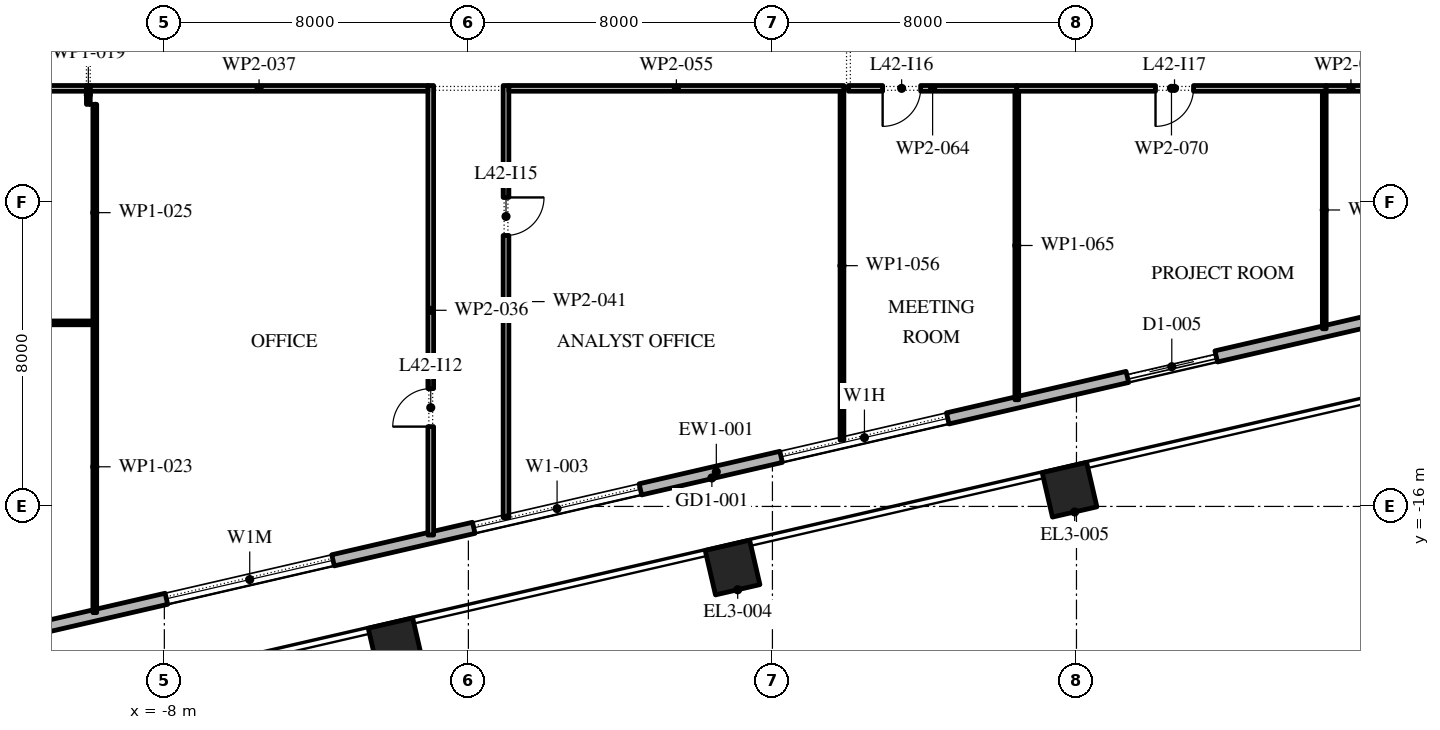
"""IFC4 building model, lengths in metres.
Left out: names, types, materials, properties, quantities, classifications, styles, units other than length and angle.
Written with IfcOpenShell. Run it as: python <this file> out.ifc"""

import sys

from ifc_helpers import new_model, si_unit, direction, frame, frame_2d, origin, origin_2d, place, context, subcontext, project, spatial, rectangle, extrude, element, fill, save


model = new_model("IFC4")
c1 = context("Model", 3, precision=1e-05, world=origin(), true_north=direction((0.0, 1.0)))
c2 = subcontext(c1, "Body", "Model", "MODEL_VIEW")
j1 = project(units=[si_unit("LENGTHUNIT", "METRE"), si_unit("PLANEANGLEUNIT", "RADIAN")], contexts=[c1])
p1 = place(None, origin())
s1 = spatial("IfcSite", under=j1, at=p1, CompositionType="ELEMENT")
p2 = place(p1, origin())
s2 = spatial("IfcBuilding", under=s1, at=p2, CompositionType="ELEMENT")
p3 = place(p2, frame((0.0, 0.0, 192.6)))
s3 = spatial("IfcBuildingStorey", under=s2, at=p3, CompositionType="ELEMENT", Elevation=192.6)
for number, where, z_axis, x_axis in (
    (1, (-1.916, -19.655, 0.0), (0.0, 0.0, 1.0), (0.974, 0.225, 0.0)),
    (2, (6.951, -17.608, 0.0), (0.0, 0.0, 1.0), (0.974, 0.225, 0.0)),
    (3, (15.818, -15.561, 0.0), (0.0, 0.0, 1.0), (0.974, 0.225, 0.0)),
):
    element("IfcColumn", number, at=place(p3, frame(where, z_axis=z_axis, x_axis=x_axis)), inside=s3, PredefinedType="COLUMN", context=c2, shape_type="SweptSolid", body=[
        extrude(rectangle(XDim=1.2, YDim=1.2, at=origin_2d()), origin(), (0.0, 0.0, 1.0), 4.2),
    ])
p4 = place(p3, frame((-17.592, -20.657, 0.0), z_axis=(0.0, 0.0, 1.0), x_axis=(0.974370243697, 0.224950279389, 0.0)))
e4 = element("IfcWall", 4, at=p4, inside=s3, PredefinedType="STANDARD", context=c2, shape_type="SweptSolid", body=[
    extrude(rectangle(XDim=49.5, YDim=0.3, at=frame_2d((24.75, 0.0))), origin(), (0.0, 0.0, 1.0), 4.0),
])
p5 = place(p4, frame((2.8, 0.0, 0.0)))
e5 = element("IfcOpeningElement", 5, at=p5, cuts=e4, PredefinedType="OPENING", context=c2, shape_type="SweptSolid", body=[
    extrude(rectangle(XDim=2.4, YDim=3.5, at=frame_2d((1.2, 1.75))), frame((0.0, 0.16, 0.0), z_axis=(0.0, -1.0, 0.0), x_axis=(1.0, 0.0, 0.0)), (0.0, 0.0, 1.0), 0.32),
])
p6 = place(p4, frame((9.9, 0.0, 0.45)))
e6 = element("IfcOpeningElement", 6, at=p6, cuts=e4, PredefinedType="OPENING", context=c2, shape_type="SweptSolid", body=[
    extrude(rectangle(XDim=4.5, YDim=2.575, at=frame_2d((2.25, 1.288))), frame((0.0, 0.16, 0.0), z_axis=(0.0, -1.0, 0.0), x_axis=(1.0, 0.0, 0.0)), (0.0, 0.0, 1.0), 0.32),
])
p7 = place(p4, frame((18.2, 0.0, 0.45)))
e7 = element("IfcOpeningElement", 7, at=p7, cuts=e4, PredefinedType="OPENING", context=c2, shape_type="SweptSolid", body=[
    extrude(rectangle(XDim=4.5, YDim=3.05, at=frame_2d((2.25, 1.525))), frame((0.0, 0.16, 0.0), z_axis=(0.0, -1.0, 0.0), x_axis=(1.0, 0.0, 0.0)), (0.0, 0.0, 1.0), 0.32),
])
p8 = place(p4, frame((26.5, 0.0, 0.45)))
e8 = element("IfcOpeningElement", 8, at=p8, cuts=e4, PredefinedType="OPENING", context=c2, shape_type="SweptSolid", body=[
    extrude(rectangle(XDim=4.5, YDim=2.75, at=frame_2d((2.25, 1.375))), frame((0.0, 0.16, 0.0), z_axis=(0.0, -1.0, 0.0), x_axis=(1.0, 0.0, 0.0)), (0.0, 0.0, 1.0), 0.32),
])
p9 = place(p4, frame((35.85, 0.0, 0.0)))
e9 = element("IfcOpeningElement", 9, at=p9, cuts=e4, PredefinedType="OPENING", context=c2, shape_type="SweptSolid", body=[
    extrude(rectangle(XDim=2.4, YDim=3.5, at=frame_2d((1.2, 1.75))), frame((0.0, 0.16, 0.0), z_axis=(0.0, -1.0, 0.0), x_axis=(1.0, 0.0, 0.0)), (0.0, 0.0, 1.0), 0.32),
])
p10 = place(p4, frame((43.1, 0.0, 0.45)))
e10 = element("IfcOpeningElement", 10, at=p10, cuts=e4, PredefinedType="OPENING", context=c2, shape_type="SweptSolid", body=[
    extrude(rectangle(XDim=4.5, YDim=2.875, at=frame_2d((2.25, 1.438))), frame((0.0, 0.16, 0.0), z_axis=(0.0, -1.0, 0.0), x_axis=(1.0, 0.0, 0.0)), (0.0, 0.0, 1.0), 0.32),
])
p11 = place(p3, frame((33.157, -5.092, 0.0), z_axis=(0.0, 0.0, 1.0), x_axis=(-0.224950279389, 0.974370243697, 0.0)))
e11 = element("IfcWall", 11, at=p11, inside=s3, PredefinedType="STANDARD", context=c2, shape_type="SweptSolid", body=[
    extrude(rectangle(XDim=49.5, YDim=0.3, at=frame_2d((24.75, 0.0))), origin(), (0.0, 0.0, 1.0), 4.0),
])
p12 = place(p11, frame((2.207, 0.0, 0.0)))
e12 = element("IfcOpeningElement", 12, at=p12, cuts=e11, PredefinedType="OPENING", context=c2, shape_type="SweptSolid", body=[
    extrude(rectangle(XDim=2.4, YDim=3.125, at=frame_2d((1.2, 1.562))), frame((0.0, 0.16, 0.0), z_axis=(0.0, -1.0, 0.0), x_axis=(1.0, 0.0, 0.0)), (0.0, 0.0, 1.0), 0.32),
])
p13 = place(p11, frame((8.121, 0.0, 0.45)))
e13 = element("IfcOpeningElement", 13, at=p13, cuts=e11, PredefinedType="OPENING", context=c2, shape_type="SweptSolid", body=[
    extrude(rectangle(XDim=4.5, YDim=2.875, at=frame_2d((2.25, 1.438))), frame((0.0, 0.16, 0.0), z_axis=(0.0, -1.0, 0.0), x_axis=(1.0, 0.0, 0.0)), (0.0, 0.0, 1.0), 0.32),
])
p14 = place(p11, frame((15.236, 0.0, 0.45)))
e14 = element("IfcOpeningElement", 14, at=p14, cuts=e11, PredefinedType="OPENING", context=c2, shape_type="SweptSolid", body=[
    extrude(rectangle(XDim=4.5, YDim=2.875, at=frame_2d((2.25, 1.438))), frame((0.0, 0.16, 0.0), z_axis=(0.0, -1.0, 0.0), x_axis=(1.0, 0.0, 0.0)), (0.0, 0.0, 1.0), 0.32),
])
p15 = place(p11, frame((22.35, 0.0, 0.45)))
e15 = element("IfcOpeningElement", 15, at=p15, cuts=e11, PredefinedType="OPENING", context=c2, shape_type="SweptSolid", body=[
    extrude(rectangle(XDim=4.5, YDim=3.0, at=frame_2d((2.25, 1.5))), frame((0.0, 0.16, 0.0), z_axis=(0.0, -1.0, 0.0), x_axis=(1.0, 0.0, 0.0)), (0.0, 0.0, 1.0), 0.32),
])
p16 = place(p11, frame((30.514, 0.0, 0.0)))
e16 = element("IfcOpeningElement", 16, at=p16, cuts=e11, PredefinedType="OPENING", context=c2, shape_type="SweptSolid", body=[
    extrude(rectangle(XDim=2.4, YDim=3.45, at=frame_2d((1.2, 1.725))), frame((0.0, 0.16, 0.0), z_axis=(0.0, -1.0, 0.0), x_axis=(1.0, 0.0, 0.0)), (0.0, 0.0, 1.0), 0.32),
])
p17 = place(p11, frame((36.579, 0.0, 0.45)))
e17 = element("IfcOpeningElement", 17, at=p17, cuts=e11, PredefinedType="OPENING", context=c2, shape_type="SweptSolid", body=[
    extrude(rectangle(XDim=4.5, YDim=3.05, at=frame_2d((2.25, 1.525))), frame((0.0, 0.16, 0.0), z_axis=(0.0, -1.0, 0.0), x_axis=(1.0, 0.0, 0.0)), (0.0, 0.0, 1.0), 0.32),
])
p18 = place(p11, frame((43.693, 0.0, 0.45)))
e18 = element("IfcOpeningElement", 18, at=p18, cuts=e11, PredefinedType="OPENING", context=c2, shape_type="SweptSolid", body=[
    extrude(rectangle(XDim=4.5, YDim=3.05, at=frame_2d((2.25, 1.525))), frame((0.0, 0.16, 0.0), z_axis=(0.0, -1.0, 0.0), x_axis=(1.0, 0.0, 0.0)), (0.0, 0.0, 1.0), 0.32),
])
p19 = place(p3, frame((-10.0, -5.42, 0.0), z_axis=(0.0, 0.0, 1.0), x_axis=(0.0, 1.0, 0.0)))
e19 = element("IfcWall", 19, at=p19, inside=s3, PredefinedType="PARTITIONING", context=c2, shape_type="SweptSolid", body=[
    extrude(rectangle(XDim=0.495, YDim=0.1, at=frame_2d((0.248, 0.0))), origin(), (0.0, 0.0, 1.0), 4.0),
])
p20 = place(p3, frame((-10.05, -5.0, 0.0), z_axis=(0.0, 0.0, 1.0), x_axis=(-1.0, 0.0, 0.0)))
e20 = element("IfcWall", 20, at=p20, inside=s3, PredefinedType="PARTITIONING", context=c2, shape_type="SweptSolid", body=[
    extrude(rectangle(XDim=13.665, YDim=0.15, at=frame_2d((6.833, 0.0))), origin(), (0.0, 0.0, 1.0), 4.0),
])
p21 = place(p20, frame((5.09, 0.0, 0.0)))
e21 = element("IfcOpeningElement", 21, at=p21, cuts=e20, PredefinedType="OPENING", context=c2, shape_type="SweptSolid", body=[
    extrude(rectangle(XDim=1.0, YDim=2.1, at=frame_2d((0.5, 1.05))), frame((0.0, 0.085, 0.0), z_axis=(0.0, -1.0, 0.0), x_axis=(1.0, 0.0, 0.0)), (0.0, 0.0, 1.0), 0.17),
])
p22 = place(p3, frame((-9.83, -18.794, 0.0), z_axis=(0.0, 0.0, 1.0), x_axis=(0.0, 1.0, 0.0)))
e22 = element("IfcWall", 22, at=p22, inside=s3, PredefinedType="PARTITIONING", context=c2, shape_type="SweptSolid", body=[
    extrude(rectangle(XDim=7.674, YDim=0.1, at=frame_2d((3.837, 0.0))), origin(), (0.0, 0.0, 1.0), 4.0),
])
p23 = place(p3, frame((-9.88, -11.17, 0.0), z_axis=(0.0, 0.0, 1.0), x_axis=(-1.0, 0.0, 0.0)))
e23 = element("IfcWall", 23, at=p23, inside=s3, PredefinedType="PARTITIONING", context=c2, shape_type="SweptSolid", body=[
    extrude(rectangle(XDim=13.68, YDim=0.1, at=frame_2d((6.84, 0.0))), origin(), (0.0, 0.0, 1.0), 4.0),
])
p24 = place(p23, frame((3.81, 0.0, 0.0)))
e24 = element("IfcOpeningElement", 24, at=p24, cuts=e23, PredefinedType="OPENING", context=c2, shape_type="SweptSolid", body=[
    extrude(rectangle(XDim=0.9, YDim=2.1, at=frame_2d((0.45, 1.05))), frame((0.0, 0.06, 0.0), z_axis=(0.0, -1.0, 0.0), x_axis=(1.0, 0.0, 0.0)), (0.0, 0.0, 1.0), 0.12),
])
p25 = place(p3, frame((-9.83, -11.12, 0.0), z_axis=(0.0, 0.0, 1.0), x_axis=(0.0, 1.0, 0.0)))
e25 = element("IfcWall", 25, at=p25, inside=s3, PredefinedType="PARTITIONING", context=c2, shape_type="SweptSolid", body=[
    extrude(rectangle(XDim=5.7, YDim=0.1, at=frame_2d((2.85, 0.0))), origin(), (0.0, 0.0, 1.0), 4.0),
])
p26 = place(p3, frame((-0.99, -16.753, 0.0), z_axis=(0.0, 0.0, 1.0), x_axis=(0.0, 1.0, 0.0)))
e26 = element("IfcWall", 26, at=p26, inside=s3, PredefinedType="PARTITIONING", context=c2, shape_type="SweptSolid", body=[
    extrude(rectangle(XDim=11.828, YDim=0.15, at=frame_2d((5.914, 0.0))), origin(), (0.0, 0.0, 1.0), 4.0),
])
p27 = place(p26, frame((2.853, 0.0, 0.0)))
e27 = element("IfcOpeningElement", 27, at=p27, cuts=e26, PredefinedType="OPENING", context=c2, shape_type="SweptSolid", body=[
    extrude(rectangle(XDim=1.0, YDim=2.1, at=frame_2d((0.5, 1.05))), frame((0.0, 0.085, 0.0), z_axis=(0.0, -1.0, 0.0), x_axis=(1.0, 0.0, 0.0)), (0.0, 0.0, 1.0), 0.17),
])
p28 = place(p3, frame((-1.065, -5.0, 0.0), z_axis=(0.0, 0.0, 1.0), x_axis=(-1.0, 0.0, 0.0)))
e28 = element("IfcWall", 28, at=p28, inside=s3, PredefinedType="PARTITIONING", context=c2, shape_type="SweptSolid", body=[
    extrude(rectangle(XDim=8.885, YDim=0.15, at=frame_2d((4.442, 0.0))), origin(), (0.0, 0.0, 1.0), 4.0),
])
p29 = place(p3, frame((0.99, -4.925, 0.0), z_axis=(0.0, 0.0, 1.0), x_axis=(0.0, -1.0, 0.0)))
e29 = element("IfcWall", 29, at=p29, inside=s3, PredefinedType="PARTITIONING", context=c2, shape_type="SweptSolid", body=[
    extrude(rectangle(XDim=11.371, YDim=0.15, at=frame_2d((5.686, 0.0))), origin(), (0.0, 0.0, 1.0), 4.0),
])
p30 = place(p29, frame((2.945, 0.0, 0.0)))
e30 = element("IfcOpeningElement", 30, at=p30, cuts=e29, PredefinedType="OPENING", context=c2, shape_type="SweptSolid", body=[
    extrude(rectangle(XDim=1.0, YDim=2.1, at=frame_2d((0.5, 1.05))), frame((0.0, 0.085, 0.0), z_axis=(0.0, -1.0, 0.0), x_axis=(1.0, 0.0, 0.0)), (0.0, 0.0, 1.0), 0.17),
])
p31 = place(p3, frame((9.88, -5.0, 0.0), z_axis=(0.0, 0.0, 1.0), x_axis=(-1.0, 0.0, 0.0)))
e31 = element("IfcWall", 31, at=p31, inside=s3, PredefinedType="PARTITIONING", context=c2, shape_type="SweptSolid", body=[
    extrude(rectangle(XDim=8.815, YDim=0.15, at=frame_2d((4.407, 0.0))), origin(), (0.0, 0.0, 1.0), 4.0),
])
p32 = place(p3, frame((9.83, -5.075, 0.0), z_axis=(0.0, 0.0, 1.0), x_axis=(0.0, -1.0, 0.0)))
e32 = element("IfcWall", 32, at=p32, inside=s3, PredefinedType="PARTITIONING", context=c2, shape_type="SweptSolid", body=[
    extrude(rectangle(XDim=9.18, YDim=0.1, at=frame_2d((4.59, 0.0))), origin(), (0.0, 0.0, 1.0), 4.0),
])
p33 = place(p3, frame((14.43, -5.0, 0.0), z_axis=(0.0, 0.0, 1.0), x_axis=(-1.0, 0.0, 0.0)))
e33 = element("IfcWall", 33, at=p33, inside=s3, PredefinedType="PARTITIONING", context=c2, shape_type="SweptSolid", body=[
    extrude(rectangle(XDim=4.43, YDim=0.15, at=frame_2d((2.215, 0.0))), origin(), (0.0, 0.0, 1.0), 4.0),
])
p34 = place(p33, frame((2.53, 0.0, 0.0)))
e34 = element("IfcOpeningElement", 34, at=p34, cuts=e33, PredefinedType="OPENING", context=c2, shape_type="SweptSolid", body=[
    extrude(rectangle(XDim=1.0, YDim=2.1, at=frame_2d((0.5, 1.05))), frame((0.0, 0.085, 0.0), z_axis=(0.0, -1.0, 0.0), x_axis=(1.0, 0.0, 0.0)), (0.0, 0.0, 1.0), 0.17),
])
p35 = place(p3, frame((14.43, -5.075, 0.0), z_axis=(0.0, 0.0, 1.0), x_axis=(0.0, -1.0, 0.0)))
e35 = element("IfcWall", 35, at=p35, inside=s3, PredefinedType="PARTITIONING", context=c2, shape_type="SweptSolid", body=[
    extrude(rectangle(XDim=8.118, YDim=0.1, at=frame_2d((4.059, 0.0))), origin(), (0.0, 0.0, 1.0), 4.0),
])
p36 = place(p3, frame((22.57, -5.0, 0.0), z_axis=(0.0, 0.0, 1.0), x_axis=(-1.0, 0.0, 0.0)))
e36 = element("IfcWall", 36, at=p36, inside=s3, PredefinedType="PARTITIONING", context=c2, shape_type="SweptSolid", body=[
    extrude(rectangle(XDim=8.14, YDim=0.15, at=frame_2d((4.07, 0.0))), origin(), (0.0, 0.0, 1.0), 4.0),
])
p37 = place(p36, frame((3.49, 0.0, 0.0)))
e37 = element("IfcOpeningElement", 37, at=p37, cuts=e36, PredefinedType="OPENING", context=c2, shape_type="SweptSolid", body=[
    extrude(rectangle(XDim=1.0, YDim=2.1, at=frame_2d((0.5, 1.05))), frame((0.0, 0.085, 0.0), z_axis=(0.0, -1.0, 0.0), x_axis=(1.0, 0.0, 0.0)), (0.0, 0.0, 1.0), 0.17),
])
p38 = place(p3, frame((22.52, -5.075, 0.0), z_axis=(0.0, 0.0, 1.0), x_axis=(0.0, -1.0, 0.0)))
e38 = element("IfcWall", 38, at=p38, inside=s3, PredefinedType="PARTITIONING", context=c2, shape_type="SweptSolid", body=[
    extrude(rectangle(XDim=6.25, YDim=0.1, at=frame_2d((3.125, 0.0))), origin(), (0.0, 0.0, 1.0), 4.0),
])
p39 = place(p3, frame((23.875, -5.0, 0.0), z_axis=(0.0, 0.0, 1.0), x_axis=(-1.0, 0.0, 0.0)))
e39 = element("IfcWall", 39, at=p39, inside=s3, PredefinedType="PARTITIONING", context=c2, shape_type="SweptSolid", body=[
    extrude(rectangle(XDim=1.305, YDim=0.15, at=frame_2d((0.652, 0.0))), origin(), (0.0, 0.0, 1.0), 4.0),
])
p40 = place(p6, origin())
e40 = element("IfcWindow", 40, at=p40, inside=s3, PartitioningType="DOUBLE_PANEL_VERTICAL", PredefinedType="WINDOW", context=c2, shape_type="SweptSolid", body=[
    extrude(rectangle(XDim=4.5, YDim=2.575, at=frame_2d((2.25, 1.288))), frame((0.0, 0.03, 0.0), z_axis=(0.0, -1.0, 0.0), x_axis=(1.0, 0.0, 0.0)), (0.0, 0.0, 1.0), 0.06),
])
fill(e6, e40)
p41 = place(p7, origin())
e41 = element("IfcWindow", 41, at=p41, inside=s3, PartitioningType="DOUBLE_PANEL_VERTICAL", PredefinedType="WINDOW", context=c2, shape_type="SweptSolid", body=[
    extrude(rectangle(XDim=4.5, YDim=3.05, at=frame_2d((2.25, 1.525))), frame((0.0, 0.03, 0.0), z_axis=(0.0, -1.0, 0.0), x_axis=(1.0, 0.0, 0.0)), (0.0, 0.0, 1.0), 0.06),
])
fill(e7, e41)
p42 = place(p8, origin())
e42 = element("IfcWindow", 42, at=p42, inside=s3, PartitioningType="DOUBLE_PANEL_VERTICAL", PredefinedType="WINDOW", context=c2, shape_type="SweptSolid", body=[
    extrude(rectangle(XDim=4.5, YDim=2.75, at=frame_2d((2.25, 1.375))), frame((0.0, 0.03, 0.0), z_axis=(0.0, -1.0, 0.0), x_axis=(1.0, 0.0, 0.0)), (0.0, 0.0, 1.0), 0.06),
])
fill(e8, e42)
p43 = place(p9, origin())
e43 = element("IfcDoor", 43, at=p43, inside=s3, OperationType="DOUBLE_DOOR_SLIDING", PredefinedType="DOOR", context=c2, shape_type="SweptSolid", body=[
    extrude(rectangle(XDim=2.4, YDim=3.5, at=frame_2d((1.2, 1.75))), frame((0.0, 0.025, 0.0), z_axis=(0.0, -1.0, 0.0), x_axis=(1.0, 0.0, 0.0)), (0.0, 0.0, 1.0), 0.05),
])
fill(e9, e43)
p44 = place(p27, origin())
e44 = element("IfcDoor", 44, at=p44, inside=s3, OperationType="SINGLE_SWING_RIGHT", PredefinedType="DOOR", context=c2, shape_type="SweptSolid", body=[
    extrude(rectangle(XDim=1.0, YDim=2.1, at=frame_2d((0.5, 1.05))), frame((0.0, 0.025, 0.0), z_axis=(0.0, -1.0, 0.0), x_axis=(1.0, 0.0, 0.0)), (0.0, 0.0, 1.0), 0.05),
])
fill(e27, e44)
p45 = place(p30, origin())
e45 = element("IfcDoor", 45, at=p45, inside=s3, OperationType="SINGLE_SWING_RIGHT", PredefinedType="DOOR", context=c2, shape_type="SweptSolid", body=[
    extrude(rectangle(XDim=1.0, YDim=2.1, at=frame_2d((0.5, 1.05))), frame((0.0, 0.025, 0.0), z_axis=(0.0, -1.0, 0.0), x_axis=(1.0, 0.0, 0.0)), (0.0, 0.0, 1.0), 0.05),
])
fill(e30, e45)
p46 = place(p34, origin())
e46 = element("IfcDoor", 46, at=p46, inside=s3, OperationType="SINGLE_SWING_LEFT", PredefinedType="DOOR", context=c2, shape_type="SweptSolid", body=[
    extrude(rectangle(XDim=1.0, YDim=2.1, at=frame_2d((0.5, 1.05))), frame((0.0, 0.025, 0.0), z_axis=(0.0, -1.0, 0.0), x_axis=(1.0, 0.0, 0.0)), (0.0, 0.0, 1.0), 0.05),
])
fill(e34, e46)
p47 = place(p37, origin())
e47 = element("IfcDoor", 47, at=p47, inside=s3, OperationType="SINGLE_SWING_LEFT", PredefinedType="DOOR", context=c2, shape_type="SweptSolid", body=[
    extrude(rectangle(XDim=1.0, YDim=2.1, at=frame_2d((0.5, 1.05))), frame((0.0, 0.025, 0.0), z_axis=(0.0, -1.0, 0.0), x_axis=(1.0, 0.0, 0.0)), (0.0, 0.0, 1.0), 0.05),
])
fill(e37, e47)
save(model, sys.argv[1])
